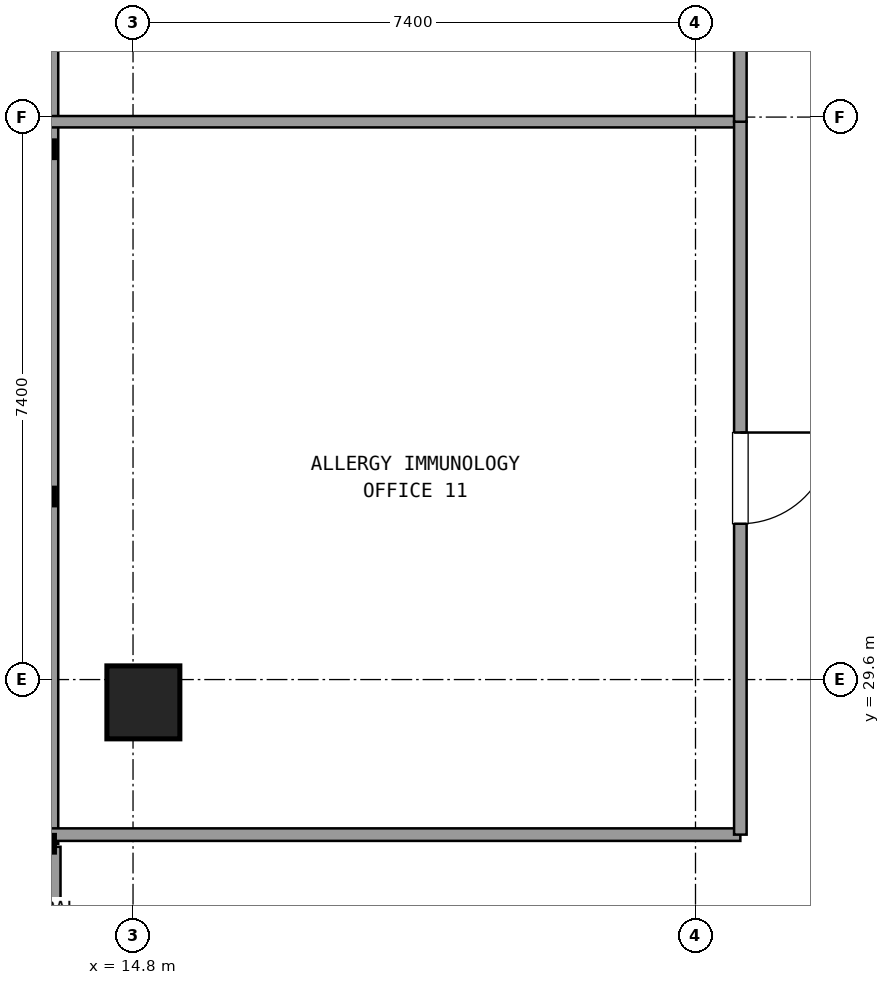
"""IFC4 building model, lengths in metres.
Left out: names, types, materials, properties, quantities, classifications, styles, units other than length and angle.
Written with IfcOpenShell. Run it as: python <this file> out.ifc"""

import sys

from ifc_helpers import new_model, si_unit, direction, frame, frame_2d, origin, origin_2d, place, context, subcontext, project, spatial, rectangle, extrude, element, fill, save


model = new_model("IFC4")
c1 = context("Model", 3, precision=1e-05, world=origin(), true_north=direction((0.0, 1.0)))
c2 = subcontext(c1, "Body", "Model", "MODEL_VIEW")
j1 = project(units=[si_unit("LENGTHUNIT", "METRE"), si_unit("PLANEANGLEUNIT", "RADIAN")], contexts=[c1])
p1 = place(None, origin())
s1 = spatial("IfcSite", under=j1, at=p1, CompositionType="ELEMENT")
p2 = place(p1, origin())
s2 = spatial("IfcBuilding", under=s1, at=p2, CompositionType="ELEMENT")
p3 = place(p2, frame((0.0, 0.0, 149.22)))
s3 = spatial("IfcBuildingStorey", under=s2, at=p3, CompositionType="ELEMENT", Elevation=149.22)
p4 = place(p3, frame((14.936, 29.3, 0.0), z_axis=(0.0, 0.0, 1.0), x_axis=(1.0, 0.0, 0.0)))
e1 = element("IfcColumn", 1, at=p4, inside=s3, PredefinedType="COLUMN", context=c2, shape_type="SweptSolid", body=[
    extrude(rectangle(XDim=0.96, YDim=0.96, at=origin_2d()), origin(), (0.0, 0.0, 1.0), 3.6),
])
p5 = place(p3, frame((13.696, 27.4, 0.0), z_axis=(0.0, 0.0, 1.0), x_axis=(0.0, -1.0, 0.0)))
e2 = element("IfcWall", 2, at=p5, inside=s3, PredefinedType="SOLIDWALL", context=c2, shape_type="SweptSolid", body=[
    extrude(rectangle(XDim=3.0, YDim=0.3, at=frame_2d((1.5, 0.0))), origin(), (0.0, 0.0, 1.0), 2.67),
])
p6 = place(p5, frame((0.9, 0.0, 0.0)))
e3 = element("IfcOpeningElement", 3, at=p6, cuts=e2, PredefinedType="OPENING", context=c2, shape_type="SweptSolid", body=[
    extrude(rectangle(XDim=1.2, YDim=2.2, at=frame_2d((0.6, 1.1))), frame((0.0, 0.16, 0.0), z_axis=(0.0, -1.0, 0.0), x_axis=(1.0, 0.0, 0.0)), (0.0, 0.0, 1.0), 0.32),
])
p7 = place(p3, frame((13.696, 41.145, 0.0), z_axis=(0.0, 0.0, 1.0), x_axis=(0.0, -1.0, 0.0)))
e4 = element("IfcWall", 4, at=p7, inside=s3, PredefinedType="SOLIDWALL", context=c2, shape_type="SweptSolid", body=[
    extrude(rectangle(XDim=13.705, YDim=0.24, at=frame_2d((6.853, 0.0))), origin(), (0.0, 0.0, 1.0), 0.85),
])
p8 = place(p3, frame((13.716, 27.56, 0.0), z_axis=(0.0, 0.0, 1.0), x_axis=(1.0, 0.0, 0.0)))
e5 = element("IfcWall", 5, at=p8, inside=s3, PredefinedType="PARTITIONING", context=c2, shape_type="SweptSolid", body=[
    extrude(rectangle(XDim=9.074, YDim=0.165, at=frame_2d((4.537, 0.0))), origin(), (0.0, 0.0, 1.0), 2.61),
])
p9 = place(p3, frame((22.79, 36.939, 0.0), z_axis=(0.0, 0.0, 1.0), x_axis=(-1.0, 0.0, 0.0)))
e6 = element("IfcWall", 6, at=p9, inside=s3, PredefinedType="PARTITIONING", context=c2, shape_type="SweptSolid", body=[
    extrude(rectangle(XDim=9.074, YDim=0.15, at=frame_2d((4.537, 0.0))), origin(), (0.0, 0.0, 1.0), 2.61),
])
p10 = place(p3, frame((22.79, 27.56, 0.0), z_axis=(0.0, 0.0, 1.0), x_axis=(0.0, 1.0, 0.0)))
e7 = element("IfcWall", 7, at=p10, inside=s3, PredefinedType="PARTITIONING", context=c2, shape_type="SweptSolid", body=[
    extrude(rectangle(XDim=9.379, YDim=0.165, at=frame_2d((4.689, 0.0))), origin(), (0.0, 0.0, 1.0), 2.61),
])
p11 = place(p10, frame((4.09, 0.0, 0.0)))
e8 = element("IfcOpeningElement", 8, at=p11, cuts=e7, PredefinedType="OPENING", context=c2, shape_type="SweptSolid", body=[
    extrude(rectangle(XDim=1.2, YDim=2.15, at=frame_2d((0.6, 1.075))), frame((0.0, 0.093, 0.0), z_axis=(0.0, -1.0, 0.0), x_axis=(1.0, 0.0, 0.0)), (0.0, 0.0, 1.0), 0.185),
])
p12 = place(p3, frame((22.79, 36.939, 0.0), z_axis=(0.0, 0.0, 1.0), x_axis=(0.0, 1.0, 0.0)))
e9 = element("IfcWall", 9, at=p12, inside=s3, PredefinedType="PARTITIONING", context=c2, shape_type="SweptSolid", body=[
    extrude(rectangle(XDim=10.161, YDim=0.165, at=frame_2d((5.081, 0.0))), origin(), (0.0, 0.0, 1.0), 2.61),
])
p13 = place(p12, frame((4.481, 0.0, 0.0)))
e10 = element("IfcOpeningElement", 10, at=p13, cuts=e9, PredefinedType="OPENING", context=c2, shape_type="SweptSolid", body=[
    extrude(rectangle(XDim=1.2, YDim=2.15, at=frame_2d((0.6, 1.075))), frame((0.0, 0.093, 0.0), z_axis=(0.0, -1.0, 0.0), x_axis=(1.0, 0.0, 0.0)), (0.0, 0.0, 1.0), 0.185),
])
p14 = place(p11, frame((1.2, 0.0, 0.0), z_axis=(0.0, 0.0, 1.0), x_axis=(-1.0, 0.0, 0.0)))
e11 = element("IfcDoor", 11, at=p14, inside=s3, OperationType="SINGLE_SWING_RIGHT", PredefinedType="DOOR", context=c2, shape_type="SweptSolid", body=[
    extrude(rectangle(XDim=1.2, YDim=2.15, at=frame_2d((0.6, 1.075))), frame((0.0, 0.025, 0.0), z_axis=(0.0, -1.0, 0.0), x_axis=(1.0, 0.0, 0.0)), (0.0, 0.0, 1.0), 0.05),
])
fill(e8, e11)
save(model, sys.argv[1])
